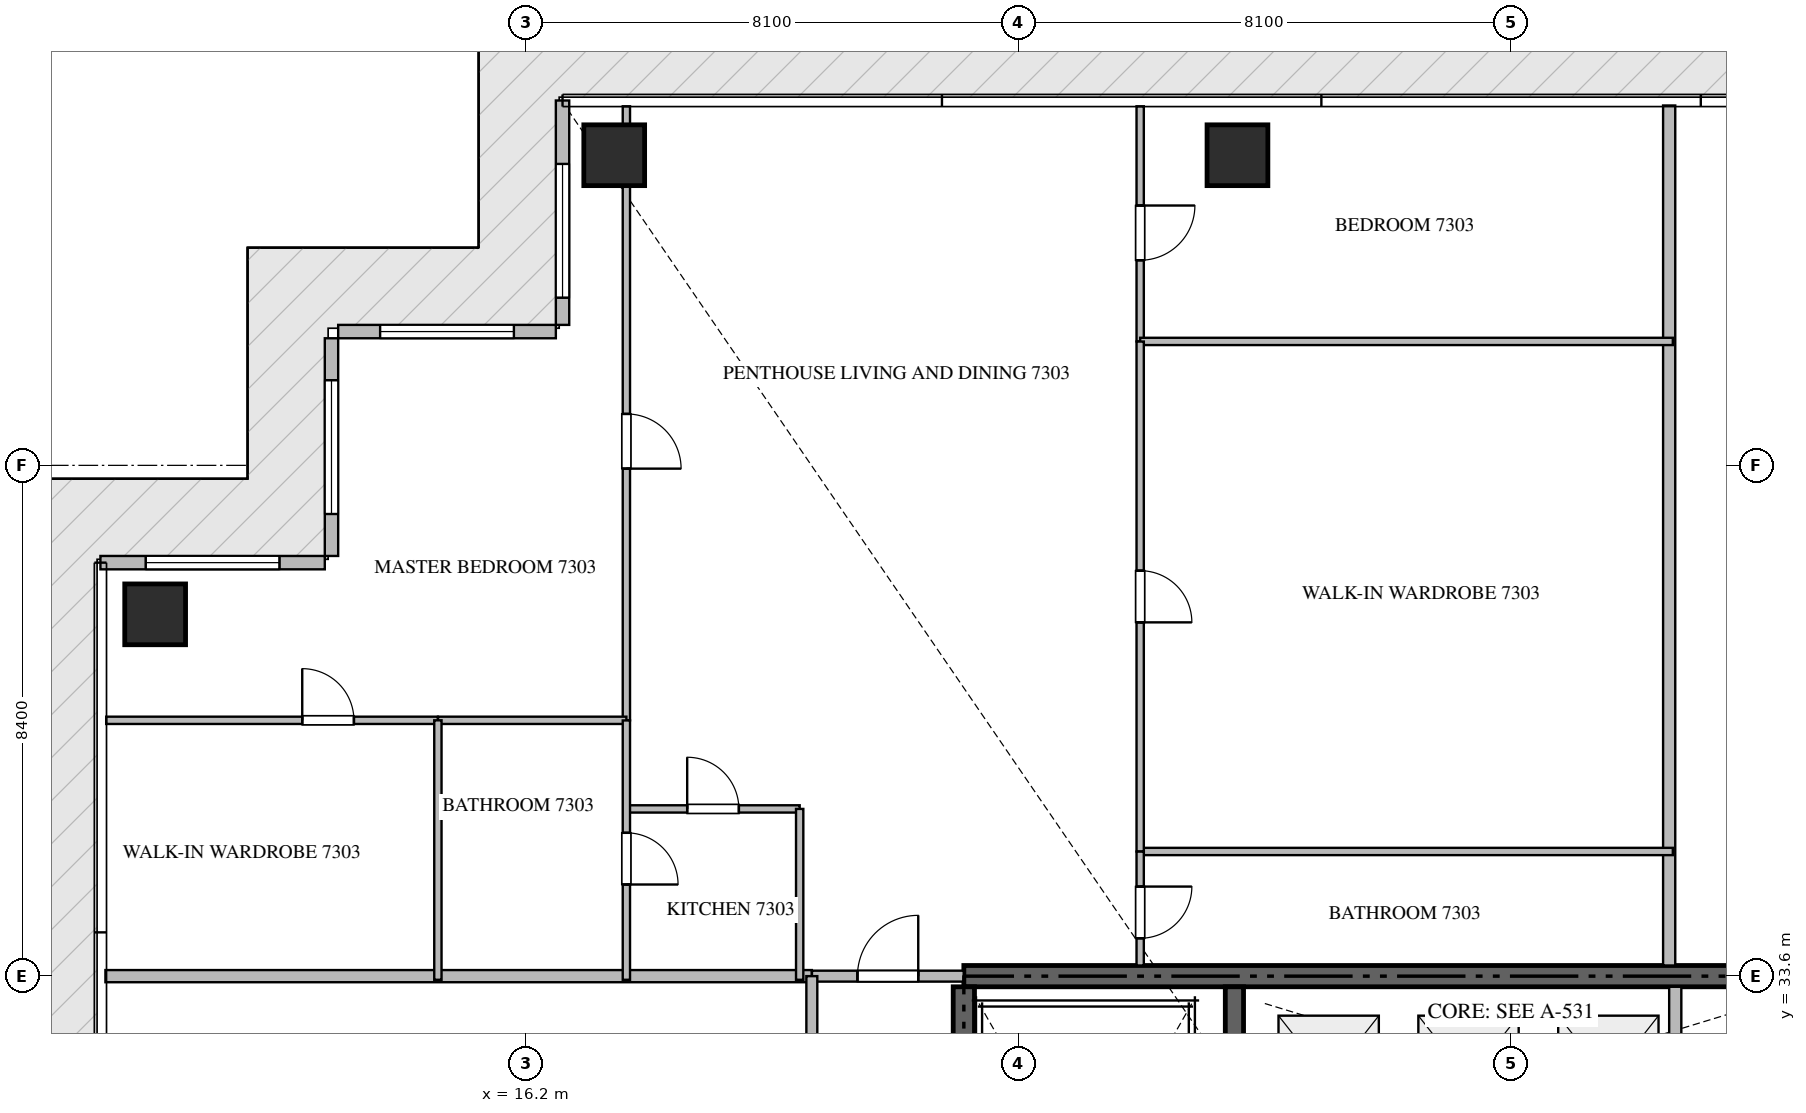
"""IFC4 building model, lengths in metres.
Left out: names, types, materials, properties, quantities, classifications, styles, units other than length and angle.
Written with IfcOpenShell. Run it as: python <this file> out.ifc"""

import sys

from ifc_helpers import new_model, si_unit, direction, frame, frame_2d, origin, origin_2d, place, context, subcontext, project, spatial, rectangle, extrude, source, transform, mapped, element, fill, save


model = new_model("IFC4")
c1 = context("Model", 3, precision=1e-05, world=origin(), true_north=direction((0.0, 1.0)))
c2 = subcontext(c1, "Body", "Model", "MODEL_VIEW")
j1 = project(units=[si_unit("LENGTHUNIT", "METRE"), si_unit("PLANEANGLEUNIT", "RADIAN")], contexts=[c1])
p1 = place(None, origin())
s1 = spatial("IfcSite", under=j1, at=p1, CompositionType="ELEMENT")
p2 = place(p1, origin())
s2 = spatial("IfcBuilding", under=s1, at=p2, CompositionType="ELEMENT")
p3 = place(p2, frame((0.0, 0.0, 293.45)))
s3 = spatial("IfcBuildingStorey", under=s2, at=p3, CompositionType="ELEMENT", Elevation=293.45)
p4 = place(p3, frame((41.4, 33.6, -0.26), z_axis=(0.0, 0.0, 1.0), x_axis=(-1.0, 0.0, 0.0)))
e1 = element("IfcWall", 1, at=p4, inside=s3, PredefinedType="SHEAR", context=c2, shape_type="SweptSolid", body=[
    extrude(rectangle(XDim=18.0, YDim=0.35, at=frame_2d((9.0, 0.0))), origin(), (0.0, 0.0, 1.0), 4.048),
])
p5 = place(p3, frame((23.4, 24.25, -0.26), z_axis=(0.0, 0.0, 1.0), x_axis=(0.0, 1.0, 0.0)))
e2 = element("IfcWall", 2, at=p5, inside=s3, PredefinedType="SHEAR", context=c2, shape_type="SweptSolid", body=[
    extrude(rectangle(XDim=9.175, YDim=0.35, at=frame_2d((4.587, 0.0))), origin(), (0.0, 0.0, 1.0), 4.048),
])
p6 = place(p3, frame((27.85, 23.55, -0.26), z_axis=(0.0, 0.0, 1.0), x_axis=(0.0, 1.0, 0.0)))
e3 = element("IfcWall", 3, at=p6, inside=s3, PredefinedType="SHEAR", context=c2, shape_type="SweptSolid", body=[
    extrude(rectangle(XDim=9.875, YDim=0.3, at=frame_2d((4.938, 0.0))), origin(), (0.0, 0.0, 1.0), 4.048),
])
m1 = source(origin(), c2, "Body", "SweptSolid", [
    extrude(rectangle(XDim=1.0, YDim=1.0, at=origin_2d()), origin(), (0.0, 0.0, 1.0), 4.05),
])
for number, where, z_axis, x_axis in (
    (4, (17.65, 47.1, -0.26), (0.0, 0.0, 1.0), (1.0, 0.0, 0.0)),
    (5, (27.9, 47.1, -0.26), (0.0, 0.0, 1.0), (1.0, 0.0, 0.0)),
    (6, (10.1, 39.55, -0.26), (0.0, 0.0, 1.0), (1.0, 0.0, 0.0)),
):
    element("IfcColumn", number, at=place(p3, frame(where, z_axis=z_axis, x_axis=x_axis)), inside=s3, PredefinedType="COLUMN", context=c2, shape_type="MappedRepresentation", body=[
        mapped(m1, transform((0.0, 0.0, 0.0), scale=1.0)),
    ])
p7 = place(p3, frame((16.8, 48.0, 0.0), z_axis=(0.0, 0.0, 1.0), x_axis=(0.0, -1.0, 0.0)))
e7 = element("IfcWall", 7, at=p7, inside=s3, PredefinedType="ELEMENTEDWALL", context=c2, shape_type="SweptSolid", body=[
    extrude(rectangle(XDim=3.69, YDim=0.22, at=frame_2d((1.845, 0.0))), origin(), (0.0, 0.0, 1.0), 3.775),
])
p8 = place(p7, frame((1.043, 0.0, 0.65)))
e8 = element("IfcOpeningElement", 8, at=p8, cuts=e7, PredefinedType="OPENING", context=c2, shape_type="SweptSolid", body=[
    extrude(rectangle(XDim=2.2, YDim=2.4, at=frame_2d((1.1, 1.2))), frame((0.0, 0.12, 0.0), z_axis=(0.0, -1.0, 0.0), x_axis=(1.0, 0.0, 0.0)), (0.0, 0.0, 1.0), 0.24),
])
p9 = place(p3, frame((16.69, 44.2, 0.0), z_axis=(0.0, 0.0, 1.0), x_axis=(-1.0, 0.0, 0.0)))
e9 = element("IfcWall", 9, at=p9, inside=s3, PredefinedType="ELEMENTEDWALL", context=c2, shape_type="SweptSolid", body=[
    extrude(rectangle(XDim=3.58, YDim=0.22, at=frame_2d((1.79, 0.0))), origin(), (0.0, 0.0, 1.0), 3.775),
])
p10 = place(p9, frame((0.69, 0.0, 0.65)))
e10 = element("IfcOpeningElement", 10, at=p10, cuts=e9, PredefinedType="OPENING", context=c2, shape_type="SweptSolid", body=[
    extrude(rectangle(XDim=2.2, YDim=2.4, at=frame_2d((1.1, 1.2))), frame((0.0, 0.12, 0.0), z_axis=(0.0, -1.0, 0.0), x_axis=(1.0, 0.0, 0.0)), (0.0, 0.0, 1.0), 0.24),
])
p11 = place(p3, frame((13.0, 44.09, 0.0), z_axis=(0.0, 0.0, 1.0), x_axis=(0.0, -1.0, 0.0)))
e11 = element("IfcWall", 11, at=p11, inside=s3, PredefinedType="ELEMENTEDWALL", context=c2, shape_type="SweptSolid", body=[
    extrude(rectangle(XDim=3.58, YDim=0.22, at=frame_2d((1.79, 0.0))), origin(), (0.0, 0.0, 1.0), 3.775),
])
p12 = place(p11, frame((0.69, 0.0, 0.65)))
e12 = element("IfcOpeningElement", 12, at=p12, cuts=e11, PredefinedType="OPENING", context=c2, shape_type="SweptSolid", body=[
    extrude(rectangle(XDim=2.2, YDim=2.4, at=frame_2d((1.1, 1.2))), frame((0.0, 0.12, 0.0), z_axis=(0.0, -1.0, 0.0), x_axis=(1.0, 0.0, 0.0)), (0.0, 0.0, 1.0), 0.24),
])
p13 = place(p3, frame((12.89, 40.4, 0.0), z_axis=(0.0, 0.0, 1.0), x_axis=(-1.0, 0.0, 0.0)))
e13 = element("IfcWall", 13, at=p13, inside=s3, PredefinedType="ELEMENTEDWALL", context=c2, shape_type="SweptSolid", body=[
    extrude(rectangle(XDim=3.69, YDim=0.22, at=frame_2d((1.845, 0.0))), origin(), (0.0, 0.0, 1.0), 3.775),
])
p14 = place(p13, frame((0.745, 0.0, 0.65)))
e14 = element("IfcOpeningElement", 14, at=p14, cuts=e13, PredefinedType="OPENING", context=c2, shape_type="SweptSolid", body=[
    extrude(rectangle(XDim=2.2, YDim=2.4, at=frame_2d((1.1, 1.2))), frame((0.0, 0.12, 0.0), z_axis=(0.0, -1.0, 0.0), x_axis=(1.0, 0.0, 0.0)), (0.0, 0.0, 1.0), 0.24),
])
p15 = place(p3, frame((35.1, 30.75, 0.0), z_axis=(0.0, 0.0, 1.0), x_axis=(0.0, 1.0, 0.0)))
e15 = element("IfcWall", 15, at=p15, inside=s3, PredefinedType="STANDARD", context=c2, shape_type="SweptSolid", body=[
    extrude(rectangle(XDim=2.675, YDim=0.2, at=frame_2d((1.337, 0.0))), origin(), (0.0, 0.0, 1.0), 3.79),
])
p16 = place(p3, frame((35.0, 33.775, 0.0), z_axis=(0.0, 0.0, 1.0), x_axis=(0.0, 1.0, 0.0)))
e16 = element("IfcWall", 16, at=p16, inside=s3, PredefinedType="PARTITIONING", context=c2, shape_type="SweptSolid", body=[
    extrude(rectangle(XDim=14.143, YDim=0.2, at=frame_2d((7.072, 0.0))), origin(), (0.0, 0.0, 1.0), 3.79),
])
p17 = place(p3, frame((9.282, 33.6, 0.0), z_axis=(0.0, 0.0, 1.0), x_axis=(1.0, 0.0, 0.0)))
e17 = element("IfcWall", 17, at=p17, inside=s3, PredefinedType="PARTITIONING", context=c2, shape_type="SweptSolid", body=[
    extrude(rectangle(XDim=11.618, YDim=0.2, at=frame_2d((5.809, 0.0))), origin(), (0.0, 0.0, 1.0), 3.79),
])
p18 = place(p3, frame((20.902, 33.6, 0.0), z_axis=(0.0, 0.0, 1.0), x_axis=(1.0, 0.0, 0.0)))
e18 = element("IfcWall", 18, at=p18, inside=s3, PredefinedType="PARTITIONING", context=c2, shape_type="SweptSolid", body=[
    extrude(rectangle(XDim=2.496, YDim=0.18, at=frame_2d((1.248, 0.0))), origin(), (0.0, 0.0, 1.0), 3.79),
])
p19 = place(p18, frame((0.748, 0.0, 0.0)))
e19 = element("IfcOpeningElement", 19, at=p19, cuts=e18, PredefinedType="OPENING", context=c2, shape_type="SweptSolid", body=[
    extrude(rectangle(XDim=1.0, YDim=2.15, at=frame_2d((0.5, 1.075))), frame((0.0, 0.1, 0.0), z_axis=(0.0, -1.0, 0.0), x_axis=(1.0, 0.0, 0.0)), (0.0, 0.0, 1.0), 0.2),
])
p20 = place(p3, frame((20.9, 16.8, 0.0), z_axis=(0.0, 0.0, 1.0), x_axis=(0.0, 1.0, 0.0)))
e20 = element("IfcWall", 20, at=p20, inside=s3, PredefinedType="PARTITIONING", context=c2, shape_type="SweptSolid", body=[
    extrude(rectangle(XDim=16.8, YDim=0.18, at=frame_2d((8.4, 0.0))), origin(), (0.0, 0.0, 1.0), 3.79),
])
p21 = place(p20, frame((14.5, 0.0, 0.0)))
e21 = element("IfcOpeningElement", 21, at=p21, cuts=e20, PredefinedType="OPENING", context=c2, shape_type="SweptSolid", body=[
    extrude(rectangle(XDim=1.0, YDim=2.15, at=frame_2d((0.5, 1.075))), frame((0.0, 0.1, 0.0), z_axis=(0.0, -1.0, 0.0), x_axis=(1.0, 0.0, 0.0)), (0.0, 0.0, 1.0), 0.2),
])
p22 = place(p3, frame((17.85, 36.35, 0.0), z_axis=(0.0, 0.0, 1.0), x_axis=(1.0, 0.0, 0.0)))
e22 = element("IfcWall", 22, at=p22, inside=s3, PredefinedType="PARTITIONING", context=c2, shape_type="SweptSolid", body=[
    extrude(rectangle(XDim=2.85, YDim=0.12, at=frame_2d((1.425, 0.0))), origin(), (0.0, 0.0, 1.0), 3.472),
])
p23 = place(p22, frame((1.0, 0.0, 0.0)))
e23 = element("IfcOpeningElement", 23, at=p23, cuts=e22, PredefinedType="OPENING", context=c2, shape_type="SweptSolid", body=[
    extrude(rectangle(XDim=0.85, YDim=2.1, at=frame_2d((0.425, 1.05))), frame((0.0, 0.07, 0.0), z_axis=(0.0, -1.0, 0.0), x_axis=(1.0, 0.0, 0.0)), (0.0, 0.0, 1.0), 0.14),
])
p24 = place(p3, frame((20.7, 36.35, 0.0), z_axis=(0.0, 0.0, 1.0), x_axis=(0.0, -1.0, 0.0)))
e24 = element("IfcWall", 24, at=p24, inside=s3, PredefinedType="PARTITIONING", context=c2, shape_type="SweptSolid", body=[
    extrude(rectangle(XDim=2.81, YDim=0.12, at=frame_2d((1.405, 0.0))), origin(), (0.0, 0.0, 1.0), 3.79),
])
p25 = place(p3, frame((17.85, 47.905, 0.0), z_axis=(0.0, 0.0, 1.0), x_axis=(0.0, -1.0, 0.0)))
e25 = element("IfcWall", 25, at=p25, inside=s3, PredefinedType="PARTITIONING", context=c2, shape_type="SweptSolid", body=[
    extrude(rectangle(XDim=10.098, YDim=0.12, at=frame_2d((5.049, 0.0))), origin(), (0.0, 0.0, 1.0), 3.292),
])
p26 = place(p25, frame((5.059, 0.0, 0.0)))
e26 = element("IfcOpeningElement", 26, at=p26, cuts=e25, PredefinedType="OPENING", context=c2, shape_type="SweptSolid", body=[
    extrude(rectangle(XDim=0.9, YDim=2.1, at=frame_2d((0.45, 1.05))), frame((0.0, 0.07, 0.0), z_axis=(0.0, -1.0, 0.0), x_axis=(1.0, 0.0, 0.0)), (0.0, 0.0, 1.0), 0.14),
])
p27 = place(p3, frame((9.295, 37.807, 0.0), z_axis=(0.0, 0.0, 1.0), x_axis=(1.0, 0.0, 0.0)))
e27 = element("IfcWall", 27, at=p27, inside=s3, PredefinedType="PARTITIONING", context=c2, shape_type="SweptSolid", body=[
    extrude(rectangle(XDim=5.455, YDim=0.12, at=frame_2d((2.728, 0.0))), origin(), (0.0, 0.0, 1.0), 3.79),
])
p28 = place(p27, frame((3.224, 0.0, 0.0)))
e28 = element("IfcOpeningElement", 28, at=p28, cuts=e27, PredefinedType="OPENING", context=c2, shape_type="SweptSolid", body=[
    extrude(rectangle(XDim=0.85, YDim=2.1, at=frame_2d((0.425, 1.05))), frame((0.0, 0.07, 0.0), z_axis=(0.0, -1.0, 0.0), x_axis=(1.0, 0.0, 0.0)), (0.0, 0.0, 1.0), 0.14),
])
p29 = place(p3, frame((14.752, 37.807, 0.0), z_axis=(0.0, 0.0, 1.0), x_axis=(1.0, 0.0, 0.0)))
e29 = element("IfcWall", 29, at=p29, inside=s3, PredefinedType="PARTITIONING", context=c2, shape_type="SweptSolid", body=[
    extrude(rectangle(XDim=3.098, YDim=0.12, at=frame_2d((1.549, 0.0))), origin(), (0.0, 0.0, 1.0), 3.79),
])
p30 = place(p3, frame((14.75, 37.807, 0.0), z_axis=(0.0, 0.0, 1.0), x_axis=(0.0, -1.0, 0.0)))
e30 = element("IfcWall", 30, at=p30, inside=s3, PredefinedType="PARTITIONING", context=c2, shape_type="SweptSolid", body=[
    extrude(rectangle(XDim=4.267, YDim=0.12, at=frame_2d((2.133, 0.0))), origin(), (0.0, 0.0, 1.0), 3.79),
])
p31 = place(p3, frame((17.85, 37.805, 0.0), z_axis=(0.0, 0.0, 1.0), x_axis=(0.0, -1.0, 0.0)))
e31 = element("IfcWall", 31, at=p31, inside=s3, PredefinedType="PARTITIONING", context=c2, shape_type="SweptSolid", body=[
    extrude(rectangle(XDim=4.265, YDim=0.12, at=frame_2d((2.132, 0.0))), origin(), (0.0, 0.0, 1.0), 3.372),
])
p32 = place(p31, frame((1.848, 0.0, 0.0)))
e32 = element("IfcOpeningElement", 32, at=p32, cuts=e31, PredefinedType="OPENING", context=c2, shape_type="SweptSolid", body=[
    extrude(rectangle(XDim=0.85, YDim=2.1, at=frame_2d((0.425, 1.05))), frame((0.0, 0.07, 0.0), z_axis=(0.0, -1.0, 0.0), x_axis=(1.0, 0.0, 0.0)), (0.0, 0.0, 1.0), 0.14),
])
p33 = place(p3, frame((26.3, 47.905, 0.0), z_axis=(0.0, 0.0, 1.0), x_axis=(0.0, -1.0, 0.0)))
e33 = element("IfcWall", 33, at=p33, inside=s3, PredefinedType="PARTITIONING", context=c2, shape_type="SweptSolid", body=[
    extrude(rectangle(XDim=3.867, YDim=0.12, at=frame_2d((1.934, 0.0))), origin(), (0.0, 0.0, 1.0), 3.79),
])
p34 = place(p33, frame((1.632, 0.0, 0.0)))
e34 = element("IfcOpeningElement", 34, at=p34, cuts=e33, PredefinedType="OPENING", context=c2, shape_type="SweptSolid", body=[
    extrude(rectangle(XDim=0.9, YDim=2.1, at=frame_2d((0.45, 1.05))), frame((0.0, 0.07, 0.0), z_axis=(0.0, -1.0, 0.0), x_axis=(1.0, 0.0, 0.0)), (0.0, 0.0, 1.0), 0.14),
])
for number, where, z_axis, x_axis in (
    (35, (26.3, 44.038, 0.0), (0.0, 0.0, 1.0), (1.0, 0.0, 0.0)),
    (36, (26.3, 35.65, 0.0), (0.0, 0.0, 1.0), (1.0, 0.0, 0.0)),
):
    element("IfcWall", number, at=place(p3, frame(where, z_axis=z_axis, x_axis=x_axis)), inside=s3, PredefinedType="PARTITIONING", context=c2, shape_type="SweptSolid", body=[
        extrude(rectangle(XDim=8.76, YDim=0.12, at=frame_2d((4.38, 0.0))), origin(), (0.0, 0.0, 1.0), 3.79),
    ])
p35 = place(p3, frame((26.3, 44.036, 0.0), z_axis=(0.0, 0.0, 1.0), x_axis=(0.0, -1.0, 0.0)))
e37 = element("IfcWall", 37, at=p35, inside=s3, PredefinedType="PARTITIONING", context=c2, shape_type="SweptSolid", body=[
    extrude(rectangle(XDim=8.386, YDim=0.12, at=frame_2d((4.193, 0.0))), origin(), (0.0, 0.0, 1.0), 3.79),
])
p36 = place(p35, frame((3.768, 0.0, 0.0)))
e38 = element("IfcOpeningElement", 38, at=p36, cuts=e37, PredefinedType="OPENING", context=c2, shape_type="SweptSolid", body=[
    extrude(rectangle(XDim=0.85, YDim=2.1, at=frame_2d((0.425, 1.05))), frame((0.0, 0.07, 0.0), z_axis=(0.0, -1.0, 0.0), x_axis=(1.0, 0.0, 0.0)), (0.0, 0.0, 1.0), 0.14),
])
p37 = place(p3, frame((26.3, 35.648, 0.0), z_axis=(0.0, 0.0, 1.0), x_axis=(0.0, -1.0, 0.0)))
e39 = element("IfcWall", 39, at=p37, inside=s3, PredefinedType="PARTITIONING", context=c2, shape_type="SweptSolid", body=[
    extrude(rectangle(XDim=1.873, YDim=0.12, at=frame_2d((0.937, 0.0))), origin(), (0.0, 0.0, 1.0), 3.79),
])
p38 = place(p37, frame((0.575, 0.0, 0.0)))
e40 = element("IfcOpeningElement", 40, at=p38, cuts=e39, PredefinedType="OPENING", context=c2, shape_type="SweptSolid", body=[
    extrude(rectangle(XDim=0.85, YDim=2.1, at=frame_2d((0.425, 1.05))), frame((0.0, 0.07, 0.0), z_axis=(0.0, -1.0, 0.0), x_axis=(1.0, 0.0, 0.0)), (0.0, 0.0, 1.0), 0.14),
])
m2 = source(origin(), c2, "Body", "SweptSolid", [
    extrude(rectangle(XDim=2.2, YDim=2.4, at=frame_2d((1.1, 1.2))), frame((0.0, 0.03, 0.0), z_axis=(0.0, -1.0, 0.0), x_axis=(1.0, 0.0, 0.0)), (0.0, 0.0, 1.0), 0.06),
])
p39 = place(p8, origin())
e41 = element("IfcWindow", 41, at=p39, inside=s3, PartitioningType="SINGLE_PANEL", PredefinedType="WINDOW", context=c2, shape_type="MappedRepresentation", body=[
    mapped(m2, transform((0.0, 0.0, 0.0), scale=1.0)),
])
fill(e8, e41)
p40 = place(p10, origin())
e42 = element("IfcWindow", 42, at=p40, inside=s3, PartitioningType="SINGLE_PANEL", PredefinedType="WINDOW", context=c2, shape_type="MappedRepresentation", body=[
    mapped(m2, transform((0.0, 0.0, 0.0), scale=1.0)),
])
fill(e10, e42)
p41 = place(p12, origin())
e43 = element("IfcWindow", 43, at=p41, inside=s3, PartitioningType="SINGLE_PANEL", PredefinedType="WINDOW", context=c2, shape_type="MappedRepresentation", body=[
    mapped(m2, transform((0.0, 0.0, 0.0), scale=1.0)),
])
fill(e12, e43)
p42 = place(p14, origin())
e44 = element("IfcWindow", 44, at=p42, inside=s3, PartitioningType="SINGLE_PANEL", PredefinedType="WINDOW", context=c2, shape_type="MappedRepresentation", body=[
    mapped(m2, transform((0.0, 0.0, 0.0), scale=1.0)),
])
fill(e14, e44)
m3 = source(origin(), c2, "Body", "SweptSolid", [
    extrude(rectangle(XDim=1.0, YDim=2.15, at=frame_2d((0.5, 1.075))), frame((0.0, 0.025, 0.0), z_axis=(0.0, -1.0, 0.0), x_axis=(1.0, 0.0, 0.0)), (0.0, 0.0, 1.0), 0.05),
])
p43 = place(p19, origin())
e45 = element("IfcDoor", 45, at=p43, inside=s3, OperationType="SINGLE_SWING_RIGHT", PredefinedType="DOOR", context=c2, shape_type="MappedRepresentation", body=[
    mapped(m3, transform((0.0, 0.0, 0.0), scale=1.0)),
])
fill(e19, e45)
m4 = source(origin(), c2, "Body", "SweptSolid", [
    extrude(rectangle(XDim=0.85, YDim=2.1, at=frame_2d((0.425, 1.05))), frame((0.0, 0.025, 0.0), z_axis=(0.0, -1.0, 0.0), x_axis=(1.0, 0.0, 0.0)), (0.0, 0.0, 1.0), 0.05),
])
p44 = place(p23, origin())
e46 = element("IfcDoor", 46, at=p44, inside=s3, OperationType="SINGLE_SWING_LEFT", PredefinedType="DOOR", context=c2, shape_type="MappedRepresentation", body=[
    mapped(m4, transform((0.0, 0.0, 0.0), scale=1.0)),
])
fill(e23, e46)
m5 = source(origin(), c2, "Body", "SweptSolid", [
    extrude(rectangle(XDim=0.9, YDim=2.1, at=frame_2d((0.45, 1.05))), frame((0.0, 0.025, 0.0), z_axis=(0.0, -1.0, 0.0), x_axis=(1.0, 0.0, 0.0)), (0.0, 0.0, 1.0), 0.05),
])
p45 = place(p26, origin())
e47 = element("IfcDoor", 47, at=p45, inside=s3, OperationType="SINGLE_SWING_RIGHT", PredefinedType="DOOR", context=c2, shape_type="MappedRepresentation", body=[
    mapped(m5, transform((0.0, 0.0, 0.0), scale=1.0)),
])
fill(e26, e47)
p46 = place(p28, origin())
e48 = element("IfcDoor", 48, at=p46, inside=s3, OperationType="SINGLE_SWING_LEFT", PredefinedType="DOOR", context=c2, shape_type="MappedRepresentation", body=[
    mapped(m4, transform((0.0, 0.0, 0.0), scale=1.0)),
])
fill(e28, e48)
p47 = place(p32, origin())
e49 = element("IfcDoor", 49, at=p47, inside=s3, OperationType="SINGLE_SWING_RIGHT", PredefinedType="DOOR", context=c2, shape_type="MappedRepresentation", body=[
    mapped(m4, transform((0.0, 0.0, 0.0), scale=1.0)),
])
fill(e32, e49)
p48 = place(p34, origin())
e50 = element("IfcDoor", 50, at=p48, inside=s3, OperationType="SINGLE_SWING_LEFT", PredefinedType="DOOR", context=c2, shape_type="MappedRepresentation", body=[
    mapped(m5, transform((0.0, 0.0, 0.0), scale=1.0)),
])
fill(e34, e50)
p49 = place(p36, origin())
e51 = element("IfcDoor", 51, at=p49, inside=s3, OperationType="SINGLE_SWING_RIGHT", PredefinedType="DOOR", context=c2, shape_type="MappedRepresentation", body=[
    mapped(m4, transform((0.0, 0.0, 0.0), scale=1.0)),
])
fill(e38, e51)
p50 = place(p38, origin())
e52 = element("IfcDoor", 52, at=p50, inside=s3, OperationType="SINGLE_SWING_LEFT", PredefinedType="DOOR", context=c2, shape_type="MappedRepresentation", body=[
    mapped(m4, transform((0.0, 0.0, 0.0), scale=1.0)),
])
fill(e40, e52)
save(model, sys.argv[1])
